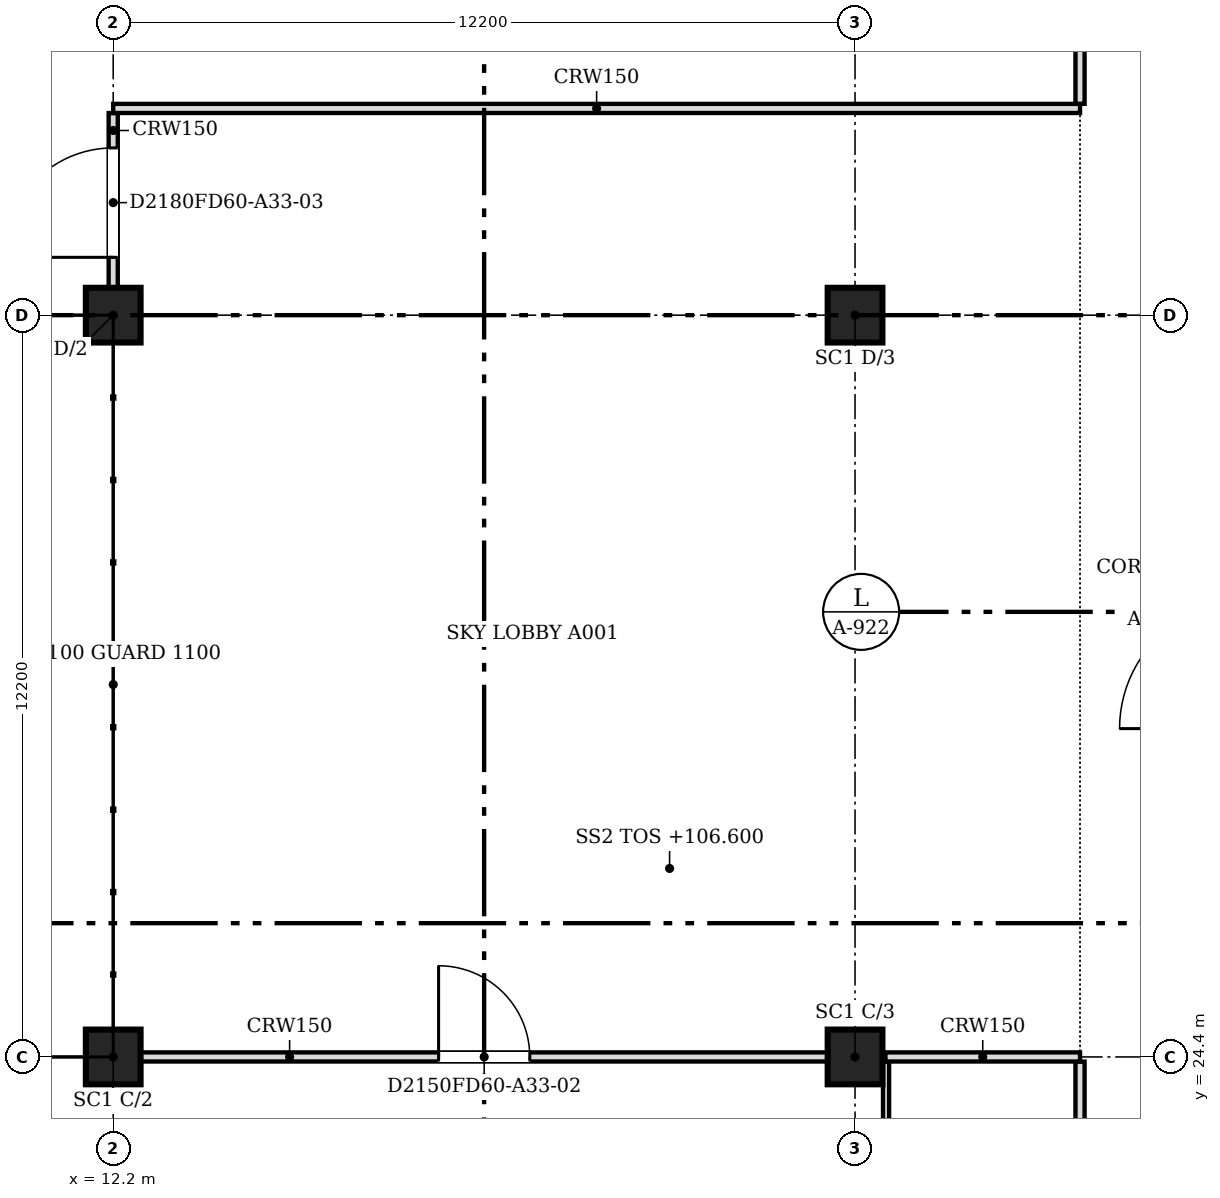
"""IFC4 building model, lengths in metres.
Left out: names, types, materials, properties, quantities, classifications, styles, units other than length and angle.
Written with IfcOpenShell. Run it as: python <this file> out.ifc"""

import sys

from ifc_helpers import new_model, si_unit, direction, frame, frame_2d, origin, origin_2d, place, context, subcontext, project, spatial, rectangle, extrude, source, transform, mapped, element, fill, save


model = new_model("IFC4")
c1 = context("Model", 3, precision=1e-05, world=origin(), true_north=direction((0.0, 1.0)))
c2 = subcontext(c1, "Body", "Model", "MODEL_VIEW")
j1 = project(units=[si_unit("LENGTHUNIT", "METRE"), si_unit("PLANEANGLEUNIT", "RADIAN")], contexts=[c1])
p1 = place(None, origin())
s1 = spatial("IfcSite", under=j1, at=p1, CompositionType="ELEMENT")
p2 = place(p1, origin())
s2 = spatial("IfcBuilding", under=s1, at=p2, CompositionType="ELEMENT")
p3 = place(p2, frame((0.0, 0.0, 106.6)))
s3 = spatial("IfcBuildingStorey", under=s2, at=p3, CompositionType="ELEMENT", Elevation=106.6)
for number, where, z_axis, x_axis in (
    (1, (12.2, 24.4, 0.0), (0.0, 0.0, 1.0), (1.0, 0.0, 0.0)),
    (2, (12.2, 36.6, 0.0), (0.0, 0.0, 1.0), (1.0, 0.0, 0.0)),
    (3, (24.4, 24.4, 0.0), (0.0, 0.0, 1.0), (1.0, 0.0, 0.0)),
    (4, (24.4, 36.6, 0.0), (0.0, 0.0, 1.0), (1.0, 0.0, 0.0)),
):
    element("IfcColumn", number, at=place(p3, frame(where, z_axis=z_axis, x_axis=x_axis)), inside=s3, PredefinedType="COLUMN", context=c2, shape_type="SweptSolid", body=[
        extrude(rectangle(XDim=0.9, YDim=0.9, at=origin_2d()), origin(), (0.0, 0.0, 1.0), 5.8),
    ])
p4 = place(p3, frame((24.91, 12.293, 0.0), z_axis=(0.0, 0.0, 1.0), x_axis=(0.0, 1.0, 0.0)))
e5 = element("IfcWall", 5, at=p4, inside=s3, PredefinedType="PARTITIONING", context=c2, shape_type="SweptSolid", body=[
    extrude(rectangle(XDim=12.031, YDim=0.1, at=frame_2d((6.015, 0.0))), origin(), (0.0, 0.0, 1.0), 5.167),
])
p5 = place(p3, frame((28.1, 22.0, 0.0), z_axis=(0.0, 0.0, 1.0), x_axis=(0.0, 1.0, 0.0)))
e6 = element("IfcWall", 6, at=p5, inside=s3, PredefinedType="PARTITIONING", context=c2, shape_type="SweptSolid", body=[
    extrude(rectangle(XDim=2.324, YDim=0.15, at=frame_2d((1.162, 0.0))), origin(), (0.0, 0.0, 1.0), 5.167),
])
p6 = place(p3, frame((23.949, 24.4, 0.0), z_axis=(0.0, 0.0, 1.0), x_axis=(-1.0, 0.0, 0.0)))
e7 = element("IfcWall", 7, at=p6, inside=s3, PredefinedType="PARTITIONING", context=c2, shape_type="SweptSolid", body=[
    extrude(rectangle(XDim=11.298, YDim=0.15, at=frame_2d((5.649, 0.0))), origin(), (0.0, 0.0, 1.0), 5.167),
])
m1 = source(origin(), c2, "Body", "SweptSolid", [
    extrude(rectangle(XDim=1.5, YDim=2.1, at=frame_2d((0.75, 1.05))), frame((0.0, 0.085, 0.0), z_axis=(0.0, -1.0, 0.0), x_axis=(1.0, 0.0, 0.0)), (0.0, 0.0, 1.0), 0.17),
])
p7 = place(p6, frame((4.898, 0.0, 0.0)))
e8 = element("IfcOpeningElement", 8, at=p7, cuts=e7, PredefinedType="OPENING", context=c2, shape_type="MappedRepresentation", body=[
    mapped(m1, transform((0.0, 0.0, 0.0), scale=1.0)),
])
p8 = place(p3, frame((24.9, 24.4, 0.0), z_axis=(0.0, 0.0, 1.0), x_axis=(1.0, 0.0, 0.0)))
e9 = element("IfcWall", 9, at=p8, inside=s3, PredefinedType="PARTITIONING", context=c2, shape_type="SweptSolid", body=[
    extrude(rectangle(XDim=3.2, YDim=0.15, at=frame_2d((1.6, 0.0))), origin(), (0.0, 0.0, 1.0), 5.167),
])
p9 = place(p3, frame((12.2, 37.051, 0.0), z_axis=(0.0, 0.0, 1.0), x_axis=(0.0, 1.0, 0.0)))
e10 = element("IfcWall", 10, at=p9, inside=s3, PredefinedType="PARTITIONING", context=c2, shape_type="SweptSolid", body=[
    extrude(rectangle(XDim=2.873, YDim=0.15, at=frame_2d((1.437, 0.0))), origin(), (0.0, 0.0, 1.0), 5.167),
])
m2 = source(origin(), c2, "Body", "SweptSolid", [
    extrude(rectangle(XDim=1.8, YDim=2.1, at=frame_2d((0.9, 1.05))), frame((0.0, 0.085, 0.0), z_axis=(0.0, -1.0, 0.0), x_axis=(1.0, 0.0, 0.0)), (0.0, 0.0, 1.0), 0.17),
])
p10 = place(p9, frame((0.5, 0.0, 0.0)))
e11 = element("IfcOpeningElement", 11, at=p10, cuts=e10, PredefinedType="OPENING", context=c2, shape_type="MappedRepresentation", body=[
    mapped(m2, transform((0.0, 0.0, 0.0), scale=1.0)),
])
p11 = place(p3, frame((12.2, 40.0, 0.0), z_axis=(0.0, 0.0, 1.0), x_axis=(1.0, 0.0, 0.0)))
e12 = element("IfcWall", 12, at=p11, inside=s3, PredefinedType="PARTITIONING", context=c2, shape_type="SweptSolid", body=[
    extrude(rectangle(XDim=15.9, YDim=0.15, at=frame_2d((7.95, 0.0))), origin(), (0.0, 0.0, 1.0), 5.167),
])
p12 = place(p3, frame((28.1, 40.076, 0.0), z_axis=(0.0, 0.0, 1.0), x_axis=(0.0, 1.0, 0.0)))
e13 = element("IfcWall", 13, at=p12, inside=s3, PredefinedType="PARTITIONING", context=c2, shape_type="SweptSolid", body=[
    extrude(rectangle(XDim=11.124, YDim=0.15, at=frame_2d((5.562, 0.0))), origin(), (0.0, 0.0, 1.0), 5.167),
])
m3 = source(origin(), c2, "Body", "SweptSolid", [
    extrude(rectangle(XDim=1.5, YDim=2.1, at=frame_2d((0.75, 1.05))), frame((0.0, 0.025, 0.0), z_axis=(0.0, -1.0, 0.0), x_axis=(1.0, 0.0, 0.0)), (0.0, 0.0, 1.0), 0.05),
])
p13 = place(p7, origin())
e14 = element("IfcDoor", 14, at=p13, inside=s3, OperationType="SINGLE_SWING_RIGHT", PredefinedType="DOOR", context=c2, shape_type="MappedRepresentation", body=[
    mapped(m3, transform((0.0, 0.0, 0.0), scale=1.0)),
])
fill(e8, e14)
m4 = source(origin(), c2, "Body", "SweptSolid", [
    extrude(rectangle(XDim=1.8, YDim=2.1, at=frame_2d((0.9, 1.05))), frame((0.0, 0.025, 0.0), z_axis=(0.0, -1.0, 0.0), x_axis=(1.0, 0.0, 0.0)), (0.0, 0.0, 1.0), 0.05),
])
p14 = place(p10, origin())
e15 = element("IfcDoor", 15, at=p14, inside=s3, OperationType="DOUBLE_DOOR_SINGLE_SWING", PredefinedType="DOOR", context=c2, shape_type="MappedRepresentation", body=[
    mapped(m4, transform((0.0, 0.0, 0.0), scale=1.0)),
])
fill(e11, e15)
save(model, sys.argv[1])
